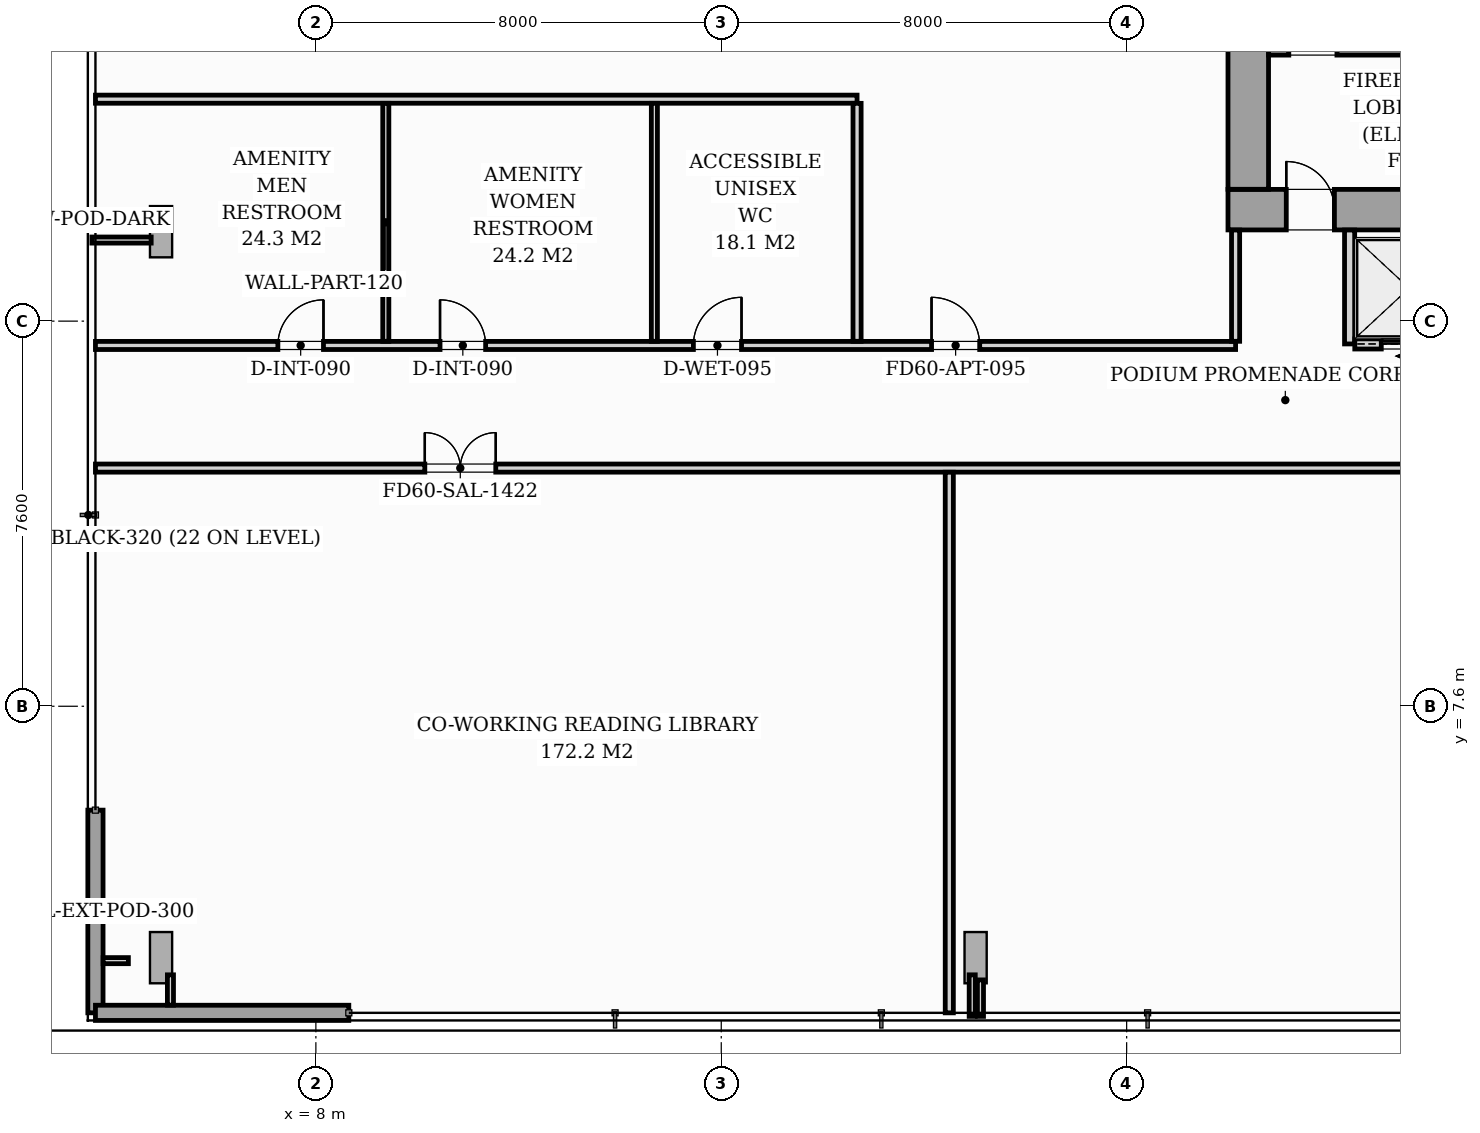
"""IFC4 building model, lengths in metres.
Left out: names, types, materials, properties, quantities, classifications, styles, units other than length and angle.
Written with IfcOpenShell. Run it as: python <this file> out.ifc"""

import sys

from ifc_helpers import new_model, si_unit, direction, frame, frame_2d, origin, origin_2d, place, context, subcontext, project, spatial, rectangle, i_section, extrude, source, transform, mapped, element, fill, save


model = new_model("IFC4")
c1 = context("Model", 3, precision=1e-05, world=origin(), true_north=direction((0.0, 1.0)))
c2 = subcontext(c1, "Body", "Model", "MODEL_VIEW")
j1 = project(units=[si_unit("LENGTHUNIT", "METRE"), si_unit("PLANEANGLEUNIT", "RADIAN")], contexts=[c1])
p1 = place(None, origin())
s1 = spatial("IfcSite", under=j1, at=p1, CompositionType="ELEMENT")
p2 = place(p1, origin())
s2 = spatial("IfcBuilding", under=s1, at=p2, CompositionType="ELEMENT")
p3 = place(p2, frame((0.0, 0.0, 14.0)))
s3 = spatial("IfcBuildingStorey", under=s2, at=p3, CompositionType="ELEMENT", Elevation=14.0)
m1 = source(origin(), c2, "Body", "SweptSolid", [
    extrude(i_section(OverallWidth=0.437, OverallDepth=0.514, WebThickness=0.061, FlangeThickness=0.097, FilletRadius=0.018, at=origin_2d()), origin(), (0.0, 0.0, 1.0), 4.496),
])
p4 = place(p3, frame((26.4, 17.4, 0.002), z_axis=(0.0, 0.0, 1.0), x_axis=(1.0, 0.0, 0.0)))
e1 = element("IfcColumn", 1, at=p4, inside=s3, PredefinedType="PILASTER", context=c2, shape_type="MappedRepresentation", body=[
    mapped(m1, transform((0.0, 0.0, 0.0), scale=1.0)),
])
m2 = source(origin(), c2, "Body", "SweptSolid", [
    extrude(i_section(OverallWidth=0.438, OverallDepth=1.011, WebThickness=0.041, FlangeThickness=0.074, FilletRadius=0.024, at=origin_2d()), origin(), (0.0, 0.0, 1.0), 4.059),
])
p5 = place(p3, frame((4.693, 2.583, 0.06), z_axis=(0.215134602061, 0.047814371999, 0.97541318877), x_axis=(-0.952179469381, -0.211625014861, 0.220384008435)))
e2 = element("IfcColumn", 2, at=p5, inside=s3, PredefinedType="COLUMN", context=c2, shape_type="MappedRepresentation", body=[
    mapped(m2, transform((0.0, 0.0, 0.0), scale=1.0)),
])
m3 = source(origin(), c2, "Body", "SweptSolid", [
    extrude(i_section(OverallWidth=0.438, OverallDepth=1.011, WebThickness=0.041, FlangeThickness=0.074, FilletRadius=0.024, at=origin_2d()), origin(), (0.0, 0.0, 1.0), 4.033),
])
p6 = place(p3, frame((21.112, 2.582, 0.032), z_axis=(-0.079308537236, 0.048795939704, 0.995655117091), x_axis=(0.848002409815, -0.521748047565, 0.093117602043)))
e3 = element("IfcColumn", 3, at=p6, inside=s3, PredefinedType="COLUMN", context=c2, shape_type="MappedRepresentation", body=[
    mapped(m3, transform((0.0, 0.0, 0.0), scale=1.0)),
])
m4 = source(origin(), c2, "Body", "SweptSolid", [
    extrude(i_section(OverallWidth=0.438, OverallDepth=1.011, WebThickness=0.041, FlangeThickness=0.074, FilletRadius=0.024, at=origin_2d()), origin(), (0.0, 0.0, 1.0), 4.1),
])
p7 = place(p3, frame((4.696, 17.186, 0.074), z_axis=(0.211578067656, -0.188056160332, 0.959098327518), x_axis=(-0.716861290505, 0.637165199948, 0.283073132162)))
e4 = element("IfcColumn", 4, at=p7, inside=s3, PredefinedType="COLUMN", context=c2, shape_type="MappedRepresentation", body=[
    mapped(m4, transform((0.0, 0.0, 0.0), scale=1.0)),
])
p8 = place(p3, frame((3.65, 1.55, 0.0), z_axis=(0.0, 0.0, 1.0), x_axis=(0.0, 1.0, 0.0)))
e5 = element("IfcWall", 5, at=p8, inside=s3, PredefinedType="STANDARD", context=c2, shape_type="SweptSolid", body=[
    extrude(rectangle(XDim=4.0, YDim=0.3, at=frame_2d((2.0, 0.0))), origin(), (0.0, 0.0, 1.0), 4.08),
])
p9 = place(p3, frame((8.65, 1.55, 0.0), z_axis=(0.0, 0.0, 1.0), x_axis=(-1.0, 0.0, 0.0)))
e6 = element("IfcWall", 6, at=p9, inside=s3, PredefinedType="STANDARD", context=c2, shape_type="SweptSolid", body=[
    extrude(rectangle(XDim=5.0, YDim=0.3, at=frame_2d((2.5, 0.0))), origin(), (0.0, 0.0, 1.0), 4.08),
])
p10 = place(p3, frame((26.0, 17.4, 0.0), z_axis=(0.0, 0.0, 1.0), x_axis=(1.0, 0.0, 0.0)))
e7 = element("IfcWall", 7, at=p10, inside=s3, PredefinedType="SHEAR", context=c2, shape_type="SweptSolid", body=[
    extrude(rectangle(XDim=20.0, YDim=0.8, at=frame_2d((10.0, 0.0))), origin(), (0.0, 0.0, 1.0), 4.5),
])
p11 = place(p10, frame((1.15, 0.0, 0.0)))
e8 = element("IfcOpeningElement", 8, at=p11, cuts=e7, PredefinedType="OPENING", context=c2, shape_type="SweptSolid", body=[
    extrude(rectangle(XDim=0.95, YDim=2.06, at=frame_2d((0.475, 1.03))), frame((0.0, 0.41, 0.0), z_axis=(0.0, -1.0, 0.0), x_axis=(1.0, 0.0, 0.0)), (0.0, 0.0, 1.0), 0.82),
])
p12 = place(p10, frame((9.58, 0.0, 0.0)))
e9 = element("IfcOpeningElement", 9, at=p12, cuts=e7, PredefinedType="OPENING", context=c2, shape_type="SweptSolid", body=[
    extrude(rectangle(XDim=0.9, YDim=2.06, at=frame_2d((0.45, 1.03))), frame((0.0, 0.41, 0.0), z_axis=(0.0, -1.0, 0.0), x_axis=(1.0, 0.0, 0.0)), (0.0, 0.0, 1.0), 0.82),
])
p13 = place(p10, frame((17.75, 0.0, 0.0)))
e10 = element("IfcOpeningElement", 10, at=p13, cuts=e7, PredefinedType="OPENING", context=c2, shape_type="SweptSolid", body=[
    extrude(rectangle(XDim=0.95, YDim=2.06, at=frame_2d((0.475, 1.03))), frame((0.0, 0.41, 0.0), z_axis=(0.0, -1.0, 0.0), x_axis=(1.0, 0.0, 0.0)), (0.0, 0.0, 1.0), 0.82),
])
p14 = place(p3, frame((26.4, 17.802, 0.0), z_axis=(0.0, 0.0, 1.0), x_axis=(0.0, 1.0, 0.0)))
e11 = element("IfcWall", 11, at=p14, inside=s3, PredefinedType="SHEAR", context=c2, shape_type="SweptSolid", body=[
    extrude(rectangle(XDim=5.796, YDim=0.8, at=frame_2d((2.898, 0.0))), origin(), (0.0, 0.0, 1.0), 4.5),
])
p15 = place(p3, frame((26.802, 20.575, 0.0), z_axis=(0.0, 0.0, 1.0), x_axis=(1.0, 0.0, 0.0)))
e12 = element("IfcWall", 12, at=p15, inside=s3, PredefinedType="SOLIDWALL", context=c2, shape_type="SweptSolid", body=[
    extrude(rectangle(XDim=8.148, YDim=0.25, at=frame_2d((4.074, 0.0))), origin(), (0.0, 0.0, 1.0), 4.5),
])
p16 = place(p15, frame((0.398, 0.0, 0.0)))
e13 = element("IfcOpeningElement", 13, at=p16, cuts=e12, PredefinedType="OPENING", context=c2, shape_type="SweptSolid", body=[
    extrude(rectangle(XDim=0.95, YDim=2.06, at=frame_2d((0.475, 1.03))), frame((0.0, 0.135, 0.0), z_axis=(0.0, -1.0, 0.0), x_axis=(1.0, 0.0, 0.0)), (0.0, 0.0, 1.0), 0.27),
])
p17 = place(p3, frame((28.4, 14.75, 0.0), z_axis=(0.0, 0.0, 1.0), x_axis=(0.0, 1.0, 0.0)))
e14 = element("IfcWall", 14, at=p17, inside=s3, PredefinedType="PARTITIONING", context=c2, shape_type="SweptSolid", body=[
    extrude(rectangle(XDim=2.248, YDim=0.2, at=frame_2d((1.124, 0.0))), origin(), (0.0, 0.0, 1.0), 4.08),
])
p18 = place(p3, frame((28.502, 14.75, 0.0), z_axis=(0.0, 0.0, 1.0), x_axis=(1.0, 0.0, 0.0)))
e15 = element("IfcWall", 15, at=p18, inside=s3, PredefinedType="PARTITIONING", context=c2, shape_type="SweptSolid", body=[
    extrude(rectangle(XDim=2.146, YDim=0.2, at=frame_2d((1.073, 0.0))), origin(), (0.0, 0.0, 1.0), 4.08),
])
p19 = place(p18, frame((0.523, 0.0, 0.0)))
e16 = element("IfcOpeningElement", 16, at=p19, cuts=e15, PredefinedType="OPENING", context=c2, shape_type="SweptSolid", body=[
    extrude(rectangle(XDim=1.05, YDim=2.08, at=frame_2d((0.525, 1.04))), frame((0.0, 0.11, 0.0), z_axis=(0.0, -1.0, 0.0), x_axis=(1.0, 0.0, 0.0)), (0.0, 0.0, 1.0), 0.22),
])
p20 = place(p3, frame((3.65, 12.3, 0.0), z_axis=(0.0, 0.0, 1.0), x_axis=(1.0, 0.0, 0.0)))
e17 = element("IfcWall", 17, at=p20, inside=s3, PredefinedType="PARTITIONING", context=c2, shape_type="SweptSolid", body=[
    extrude(rectangle(XDim=67.648, YDim=0.16, at=frame_2d((33.824, 0.0))), origin(), (0.0, 0.0, 1.0), 4.08),
])
p21 = place(p20, frame((6.5, 0.0, 0.0)))
e18 = element("IfcOpeningElement", 18, at=p21, cuts=e17, PredefinedType="OPENING", context=c2, shape_type="SweptSolid", body=[
    extrude(rectangle(XDim=1.4, YDim=2.08, at=frame_2d((0.7, 1.04))), frame((0.0, 0.09, 0.0), z_axis=(0.0, -1.0, 0.0), x_axis=(1.0, 0.0, 0.0)), (0.0, 0.0, 1.0), 0.18),
])
p22 = place(p20, frame((28.0, 0.0, 0.0)))
e19 = element("IfcOpeningElement", 19, at=p22, cuts=e17, PredefinedType="OPENING", context=c2, shape_type="SweptSolid", body=[
    extrude(rectangle(XDim=1.4, YDim=2.08, at=frame_2d((0.7, 1.04))), frame((0.0, 0.09, 0.0), z_axis=(0.0, -1.0, 0.0), x_axis=(1.0, 0.0, 0.0)), (0.0, 0.0, 1.0), 0.18),
])
p23 = place(p3, frame((3.65, 14.72, 0.0), z_axis=(0.0, 0.0, 1.0), x_axis=(1.0, 0.0, 0.0)))
e20 = element("IfcWall", 20, at=p23, inside=s3, PredefinedType="PARTITIONING", context=c2, shape_type="SweptSolid", body=[
    extrude(rectangle(XDim=22.5, YDim=0.16, at=frame_2d((11.25, 0.0))), origin(), (0.0, 0.0, 1.0), 4.08),
])
p24 = place(p23, frame((16.5, 0.0, 0.0)))
e21 = element("IfcOpeningElement", 21, at=p24, cuts=e20, PredefinedType="OPENING", context=c2, shape_type="SweptSolid", body=[
    extrude(rectangle(XDim=0.95, YDim=2.06, at=frame_2d((0.475, 1.03))), frame((0.0, 0.09, 0.0), z_axis=(0.0, -1.0, 0.0), x_axis=(1.0, 0.0, 0.0)), (0.0, 0.0, 1.0), 0.18),
])
p25 = place(p23, frame((3.6, 0.0, 0.0)))
e22 = element("IfcOpeningElement", 22, at=p25, cuts=e20, PredefinedType="OPENING", context=c2, shape_type="SweptSolid", body=[
    extrude(rectangle(XDim=0.9, YDim=2.05, at=frame_2d((0.45, 1.025))), frame((0.0, 0.09, 0.0), z_axis=(0.0, -1.0, 0.0), x_axis=(1.0, 0.0, 0.0)), (0.0, 0.0, 1.0), 0.18),
])
p26 = place(p23, frame((6.8, 0.0, 0.0)))
e23 = element("IfcOpeningElement", 23, at=p26, cuts=e20, PredefinedType="OPENING", context=c2, shape_type="SweptSolid", body=[
    extrude(rectangle(XDim=0.9, YDim=2.05, at=frame_2d((0.45, 1.025))), frame((0.0, 0.09, 0.0), z_axis=(0.0, -1.0, 0.0), x_axis=(1.0, 0.0, 0.0)), (0.0, 0.0, 1.0), 0.18),
])
p27 = place(p23, frame((11.8, 0.0, 0.0)))
e24 = element("IfcOpeningElement", 24, at=p27, cuts=e20, PredefinedType="OPENING", context=c2, shape_type="SweptSolid", body=[
    extrude(rectangle(XDim=0.95, YDim=2.1, at=frame_2d((0.475, 1.05))), frame((0.0, 0.09, 0.0), z_axis=(0.0, -1.0, 0.0), x_axis=(1.0, 0.0, 0.0)), (0.0, 0.0, 1.0), 0.18),
])
p28 = place(p3, frame((20.5, 1.55, 0.0), z_axis=(0.0, 0.0, 1.0), x_axis=(0.0, 1.0, 0.0)))
e25 = element("IfcWall", 25, at=p28, inside=s3, PredefinedType="PARTITIONING", context=c2, shape_type="SweptSolid", body=[
    extrude(rectangle(XDim=10.668, YDim=0.16, at=frame_2d((5.334, 0.0))), origin(), (0.0, 0.0, 1.0), 3.185),
])
p29 = place(p3, frame((3.65, 19.58, 0.0), z_axis=(0.0, 0.0, 1.0), x_axis=(1.0, 0.0, 0.0)))
e26 = element("IfcWall", 26, at=p29, inside=s3, PredefinedType="PARTITIONING", context=c2, shape_type="SweptSolid", body=[
    extrude(rectangle(XDim=15.03, YDim=0.16, at=frame_2d((7.515, 0.0))), origin(), (0.0, 0.0, 1.0), 4.08),
])
for number, where, z_axis, x_axis in (
    (27, (9.38, 14.802, 0.0), (0.0, 0.0, 1.0), (0.0, 1.0, 0.0)),
    (28, (14.68, 14.802, 0.0), (0.0, 0.0, 1.0), (0.0, 1.0, 0.0)),
):
    element("IfcWall", number, at=place(p3, frame(where, z_axis=z_axis, x_axis=x_axis)), inside=s3, PredefinedType="PARTITIONING", context=c2, shape_type="SweptSolid", body=[
        extrude(rectangle(XDim=4.696, YDim=0.12, at=frame_2d((2.348, 0.0))), origin(), (0.0, 0.0, 1.0), 4.08),
    ])
p30 = place(p3, frame((18.68, 14.802, 0.0), z_axis=(0.0, 0.0, 1.0), x_axis=(0.0, 1.0, 0.0)))
e29 = element("IfcWall", 29, at=p30, inside=s3, PredefinedType="PARTITIONING", context=c2, shape_type="SweptSolid", body=[
    extrude(rectangle(XDim=4.696, YDim=0.16, at=frame_2d((2.348, 0.0))), origin(), (0.0, 0.0, 1.0), 4.08),
])
p31 = place(p3, frame((26.15, 14.802, 0.0), z_axis=(0.0, 0.0, 1.0), x_axis=(0.0, 1.0, 0.0)))
e30 = element("IfcWall", 30, at=p31, inside=s3, PredefinedType="PARTITIONING", context=c2, shape_type="SweptSolid", body=[
    extrude(rectangle(XDim=2.196, YDim=0.16, at=frame_2d((1.098, 0.0))), origin(), (0.0, 0.0, 1.0), 4.08),
])
p32 = place(p3, frame((5.13, 2.3, 0.0), z_axis=(0.0, 0.0, 1.0), x_axis=(0.0, -1.0, 0.0)))
e31 = element("IfcWall", 31, at=p32, inside=s3, PredefinedType="PARTITIONING", context=c2, shape_type="SweptSolid", body=[
    extrude(rectangle(XDim=0.598, YDim=0.12, at=frame_2d((0.299, 0.0))), origin(), (0.0, 0.0, 1.0), 4.08),
])
p33 = place(p3, frame((20.952, 2.3, 0.0), z_axis=(0.0, 0.0, 1.0), x_axis=(0.0, -1.0, 0.0)))
e32 = element("IfcWall", 32, at=p33, inside=s3, PredefinedType="PARTITIONING", context=c2, shape_type="SweptSolid", body=[
    extrude(rectangle(XDim=0.82, YDim=0.12, at=frame_2d((0.41, 0.0))), origin(), (0.0, 0.0, 1.0), 4.08),
])
p34 = place(p3, frame((4.75, 16.8, 0.0), z_axis=(0.0, 0.0, 1.0), x_axis=(-1.0, 0.0, 0.0)))
e33 = element("IfcWall", 33, at=p34, inside=s3, PredefinedType="PARTITIONING", context=c2, shape_type="SweptSolid", body=[
    extrude(rectangle(XDim=1.17, YDim=0.12, at=frame_2d((0.585, 0.0))), origin(), (0.0, 0.0, 1.0), 4.08),
])
p35 = place(p3, frame((4.3, 2.58, 0.0), z_axis=(0.0, 0.0, 1.0), x_axis=(-1.0, 0.0, 0.0)))
e34 = element("IfcWall", 34, at=p35, inside=s3, PredefinedType="PARTITIONING", context=c2, shape_type="SweptSolid", body=[
    extrude(rectangle(XDim=0.498, YDim=0.12, at=frame_2d((0.249, 0.0))), origin(), (0.0, 0.0, 1.0), 4.08),
])
for number, where, z_axis, x_axis in (
    (35, (21.115, 2.2, 0.0), (0.0, 0.0, 1.0), (0.0, -1.0, 0.0)),
    (36, (4.3, 17.2, 0.0), (0.0, 0.0, 1.0), (-1.0, 0.0, 0.0)),
):
    element("IfcWall", number, at=place(p3, frame(where, z_axis=z_axis, x_axis=x_axis)), inside=s3, PredefinedType="PARTITIONING", context=c2, shape_type="SweptSolid", body=[
        extrude(rectangle(XDim=0.72, YDim=0.12, at=frame_2d((0.36, 0.0))), origin(), (0.0, 0.0, 1.0), 4.08),
    ])
m5 = source(origin(), c2, "Body", "SweptSolid", [
    extrude(rectangle(XDim=0.95, YDim=2.06, at=frame_2d((0.475, 1.03))), frame((0.0, 0.025, 0.0), z_axis=(0.0, -1.0, 0.0), x_axis=(1.0, 0.0, 0.0)), (0.0, 0.0, 1.0), 0.05),
])
p36 = place(p11, origin())
e37 = element("IfcDoor", 37, at=p36, inside=s3, OperationType="SINGLE_SWING_LEFT", PredefinedType="DOOR", context=c2, shape_type="MappedRepresentation", body=[
    mapped(m5, transform((0.0, 0.0, 0.0), scale=1.0)),
])
fill(e8, e37)
m6 = source(origin(), c2, "Body", "SweptSolid", [
    extrude(rectangle(XDim=1.05, YDim=2.08, at=frame_2d((0.525, 1.04))), frame((0.0, 0.025, 0.0), z_axis=(0.0, -1.0, 0.0), x_axis=(1.0, 0.0, 0.0)), (0.0, 0.0, 1.0), 0.05),
])
p37 = place(p19, origin())
e38 = element("IfcDoor", 38, at=p37, inside=s3, OperationType="SLIDING_TO_LEFT", PredefinedType="DOOR", context=c2, shape_type="MappedRepresentation", body=[
    mapped(m6, transform((0.0, 0.0, 0.0), scale=1.0)),
])
fill(e16, e38)
m7 = source(origin(), c2, "Body", "SweptSolid", [
    extrude(rectangle(XDim=1.4, YDim=2.08, at=frame_2d((0.7, 1.04))), frame((0.0, 0.025, 0.0), z_axis=(0.0, -1.0, 0.0), x_axis=(1.0, 0.0, 0.0)), (0.0, 0.0, 1.0), 0.05),
])
p38 = place(p21, origin())
e39 = element("IfcDoor", 39, at=p38, inside=s3, OperationType="DOUBLE_DOOR_SINGLE_SWING", PredefinedType="DOOR", context=c2, shape_type="MappedRepresentation", body=[
    mapped(m7, transform((0.0, 0.0, 0.0), scale=1.0)),
])
fill(e18, e39)
m8 = source(origin(), c2, "Body", "SweptSolid", [
    extrude(rectangle(XDim=0.95, YDim=2.06, at=frame_2d((0.475, 1.03))), frame((0.0, 0.025, 0.0), z_axis=(0.0, -1.0, 0.0), x_axis=(1.0, 0.0, 0.0)), (0.0, 0.0, 1.0), 0.05),
])
p39 = place(p24, origin())
e40 = element("IfcDoor", 40, at=p39, inside=s3, OperationType="SINGLE_SWING_LEFT", PredefinedType="DOOR", context=c2, shape_type="MappedRepresentation", body=[
    mapped(m8, transform((0.0, 0.0, 0.0), scale=1.0)),
])
fill(e21, e40)
m9 = source(origin(), c2, "Body", "SweptSolid", [
    extrude(rectangle(XDim=0.9, YDim=2.05, at=frame_2d((0.45, 1.025))), frame((0.0, 0.025, 0.0), z_axis=(0.0, -1.0, 0.0), x_axis=(1.0, 0.0, 0.0)), (0.0, 0.0, 1.0), 0.05),
])
p40 = place(p25, origin())
e41 = element("IfcDoor", 41, at=p40, inside=s3, OperationType="SINGLE_SWING_RIGHT", PredefinedType="DOOR", context=c2, shape_type="MappedRepresentation", body=[
    mapped(m9, transform((0.0, 0.0, 0.0), scale=1.0)),
])
fill(e22, e41)
p41 = place(p26, origin())
e42 = element("IfcDoor", 42, at=p41, inside=s3, OperationType="SINGLE_SWING_LEFT", PredefinedType="DOOR", context=c2, shape_type="MappedRepresentation", body=[
    mapped(m9, transform((0.0, 0.0, 0.0), scale=1.0)),
])
fill(e23, e42)
m10 = source(origin(), c2, "Body", "SweptSolid", [
    extrude(rectangle(XDim=0.95, YDim=2.1, at=frame_2d((0.475, 1.05))), frame((0.0, 0.025, 0.0), z_axis=(0.0, -1.0, 0.0), x_axis=(1.0, 0.0, 0.0)), (0.0, 0.0, 1.0), 0.05),
])
p42 = place(p27, origin())
e43 = element("IfcDoor", 43, at=p42, inside=s3, OperationType="SINGLE_SWING_RIGHT", PredefinedType="DOOR", context=c2, shape_type="MappedRepresentation", body=[
    mapped(m10, transform((0.0, 0.0, 0.0), scale=1.0)),
])
fill(e24, e43)
save(model, sys.argv[1])
